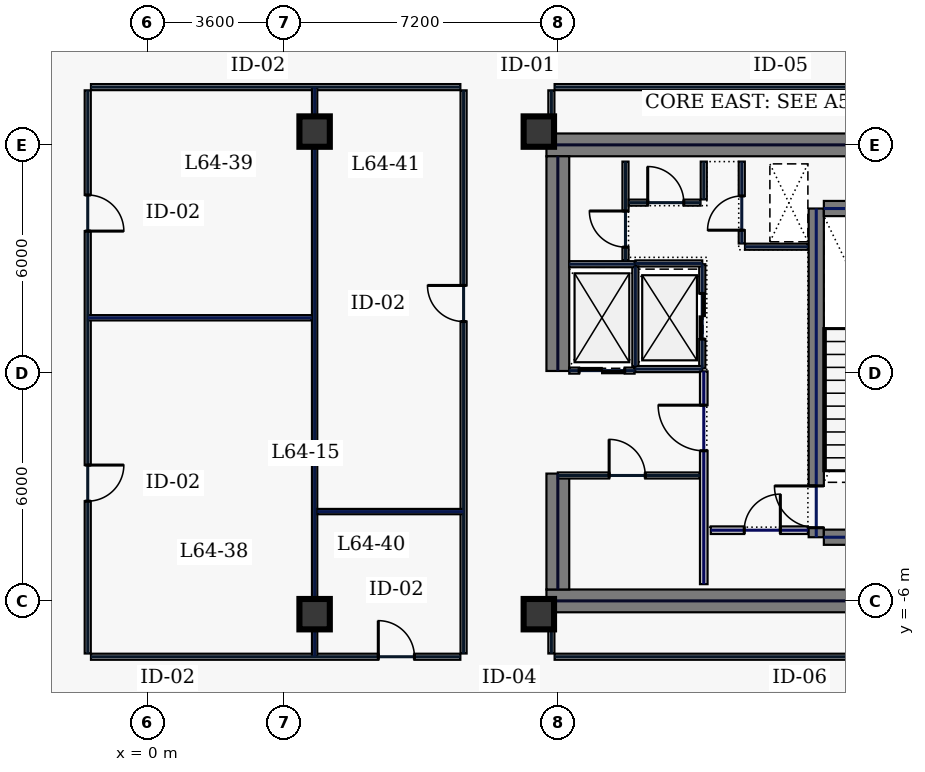
"""IFC4 building model, lengths in metres.
Left out: names, types, materials, properties, quantities, classifications, styles, units other than length and angle.
Written with IfcOpenShell. Run it as: python <this file> out.ifc"""

import sys

from ifc_helpers import new_model, si_unit, direction, frame, frame_2d, origin, origin_2d, place, context, subcontext, project, spatial, rectangle, hollow_rectangle, extrude, element, fill, save


model = new_model("IFC4")
c1 = context("Model", 3, precision=1e-05, world=origin(), true_north=direction((0.0, 1.0)))
c2 = subcontext(c1, "Body", "Model", "MODEL_VIEW")
j1 = project(units=[si_unit("LENGTHUNIT", "METRE"), si_unit("PLANEANGLEUNIT", "RADIAN")], contexts=[c1])
p1 = place(None, origin())
s1 = spatial("IfcSite", under=j1, at=p1, CompositionType="ELEMENT")
p2 = place(p1, origin())
s2 = spatial("IfcBuilding", under=s1, at=p2, CompositionType="ELEMENT")
p3 = place(p2, frame((0.0, 0.0, 277.0)))
s3 = spatial("IfcBuildingStorey", under=s2, at=p3, CompositionType="ELEMENT", Elevation=277.0)
for number, where, z_axis, x_axis in (
    (1, (10.5, 6.0, 0.0), (0.0, 0.0, 1.0), (1.0, 0.0, 0.0)),
    (2, (10.5, -6.0, 0.0), (0.0, 0.0, 1.0), (1.0, 0.0, 0.0)),
):
    element("IfcWall", number, at=place(p3, frame(where, z_axis=z_axis, x_axis=x_axis)), inside=s3, PredefinedType="SHEAR", context=c2, shape_type="SweptSolid", body=[
        extrude(rectangle(XDim=11.5, YDim=0.6, at=frame_2d((5.75, 0.0))), origin(), (0.0, 0.0, 1.0), 3.74),
    ])
p4 = place(p3, frame((10.8, -5.7, 0.0), z_axis=(0.0, 0.0, 1.0), x_axis=(0.0, 1.0, 0.0)))
e3 = element("IfcWall", 3, at=p4, inside=s3, PredefinedType="SHEAR", context=c2, shape_type="SweptSolid", body=[
    extrude(rectangle(XDim=3.05, YDim=0.6, at=frame_2d((1.525, 0.0))), origin(), (0.0, 0.0, 1.0), 3.74),
])
p5 = place(p3, frame((10.8, 0.05, 0.0), z_axis=(0.0, 0.0, 1.0), x_axis=(0.0, 1.0, 0.0)))
e4 = element("IfcWall", 4, at=p5, inside=s3, PredefinedType="SHEAR", context=c2, shape_type="SweptSolid", body=[
    extrude(rectangle(XDim=5.65, YDim=0.6, at=frame_2d((2.825, 0.0))), origin(), (0.0, 0.0, 1.0), 3.74),
])
p6 = place(p3, frame((17.6, -4.325, 0.0), z_axis=(0.0, 0.0, 1.0), x_axis=(0.0, 1.0, 0.0)))
e5 = element("IfcWall", 5, at=p6, inside=s3, PredefinedType="SHEAR", context=c2, shape_type="SweptSolid", body=[
    extrude(rectangle(XDim=8.65, YDim=0.4, at=frame_2d((4.325, 0.0))), origin(), (0.0, 0.0, 1.0), 3.74),
])
p7 = place(p6, frame((0.25, 0.0, 0.0)))
e6 = element("IfcOpeningElement", 6, at=p7, cuts=e5, PredefinedType="OPENING", context=c2, shape_type="SweptSolid", body=[
    extrude(rectangle(XDim=1.1, YDim=2.2, at=frame_2d((0.55, 1.1))), frame((0.0, 0.21, 0.0), z_axis=(0.0, -1.0, 0.0), x_axis=(1.0, 0.0, 0.0)), (0.0, 0.0, 1.0), 0.42),
])
for number, where, z_axis, x_axis in (
    (7, (17.8, -4.325, 0.0), (0.0, 0.0, 1.0), (1.0, 0.0, 0.0)),
    (8, (17.8, 4.325, 0.0), (0.0, 0.0, 1.0), (1.0, 0.0, 0.0)),
):
    element("IfcWall", number, at=place(p3, frame(where, z_axis=z_axis, x_axis=x_axis)), inside=s3, PredefinedType="SHEAR", context=c2, shape_type="SweptSolid", body=[
        extrude(rectangle(XDim=3.4, YDim=0.4, at=frame_2d((1.7, 0.0))), origin(), (0.0, 0.0, 1.0), 3.74),
    ])
for number, where, z_axis, x_axis in (
    (9, (10.3, -6.35, 0.0), (0.0, 0.0, 1.0), (1.0, 0.0, 0.0)),
    (10, (10.3, 6.35, 0.0), (0.0, 0.0, 1.0), (1.0, 0.0, 0.0)),
    (11, (4.4, -6.35, 0.0), (0.0, 0.0, 1.0), (1.0, 0.0, 0.0)),
    (12, (4.4, 6.35, 0.0), (0.0, 0.0, 1.0), (1.0, 0.0, 0.0)),
):
    element("IfcColumn", number, at=place(p3, frame(where, z_axis=z_axis, x_axis=x_axis)), inside=s3, PredefinedType="COLUMN", context=c2, shape_type="SweptSolid", body=[
        extrude(hollow_rectangle(XDim=0.8, YDim=0.8, WallThickness=0.036, at=origin_2d()), origin(), (0.0, 0.0, 1.0), 3.74),
    ])
p8 = place(p3, frame((14.6, 0.12, 0.0), z_axis=(0.0, 0.0, 1.0), x_axis=(0.0, 1.0, 0.0)))
e13 = element("IfcWall", 13, at=p8, inside=s3, PredefinedType="PARTITIONING", context=c2, shape_type="SweptSolid", body=[
    extrude(rectangle(XDim=2.74, YDim=0.16, at=frame_2d((1.37, 0.0))), origin(), (0.0, 0.0, 1.0), 3.74),
])
p9 = place(p8, frame((0.77, 0.0, 0.0)))
e14 = element("IfcOpeningElement", 14, at=p9, cuts=e13, PredefinedType="OPENING", context=c2, shape_type="SweptSolid", body=[
    extrude(rectangle(XDim=1.2, YDim=2.2, at=frame_2d((0.6, 1.1))), frame((0.0, 0.09, 0.0), z_axis=(0.0, -1.0, 0.0), x_axis=(1.0, 0.0, 0.0)), (0.0, 0.0, 1.0), 0.18),
])
for number, where, z_axis, x_axis in (
    (15, (12.84, 0.1, 0.0), (0.0, 0.0, 1.0), (1.0, 0.0, 0.0)),
    (16, (12.84, 2.88, 0.0), (0.0, 0.0, 1.0), (1.0, 0.0, 0.0)),
):
    element("IfcWall", number, at=place(p3, frame(where, z_axis=z_axis, x_axis=x_axis)), inside=s3, PredefinedType="PARTITIONING", context=c2, shape_type="SweptSolid", body=[
        extrude(rectangle(XDim=1.76, YDim=0.16, at=frame_2d((0.88, 0.0))), origin(), (0.0, 0.0, 1.0), 3.74),
    ])
p10 = place(p3, frame((12.84, 0.18, 0.0), z_axis=(0.0, 0.0, 1.0), x_axis=(0.0, 1.0, 0.0)))
e17 = element("IfcWall", 17, at=p10, inside=s3, PredefinedType="PARTITIONING", context=c2, shape_type="SweptSolid", body=[
    extrude(rectangle(XDim=2.62, YDim=0.16, at=frame_2d((1.31, 0.0))), origin(), (0.0, 0.0, 1.0), 3.74),
])
p11 = place(p3, frame((11.1, 0.06, 0.0), z_axis=(0.0, 0.0, 1.0), x_axis=(1.0, 0.0, 0.0)))
e18 = element("IfcWall", 18, at=p11, inside=s3, PredefinedType="PARTITIONING", context=c2, shape_type="SweptSolid", body=[
    extrude(rectangle(XDim=1.72, YDim=0.16, at=frame_2d((0.86, 0.0))), origin(), (0.0, 0.0, 1.0), 3.74),
])
p12 = place(p11, frame((0.26, 0.0, 0.0)))
e19 = element("IfcOpeningElement", 19, at=p12, cuts=e18, PredefinedType="OPENING", context=c2, shape_type="SweptSolid", body=[
    extrude(rectangle(XDim=1.2, YDim=2.2, at=frame_2d((0.6, 1.1))), frame((0.0, 0.09, 0.0), z_axis=(0.0, -1.0, 0.0), x_axis=(1.0, 0.0, 0.0)), (0.0, 0.0, 1.0), 0.18),
])
p13 = place(p3, frame((11.1, 2.86, 0.0), z_axis=(0.0, 0.0, 1.0), x_axis=(1.0, 0.0, 0.0)))
e20 = element("IfcWall", 20, at=p13, inside=s3, PredefinedType="PARTITIONING", context=c2, shape_type="SweptSolid", body=[
    extrude(rectangle(XDim=1.72, YDim=0.16, at=frame_2d((0.86, 0.0))), origin(), (0.0, 0.0, 1.0), 3.74),
])
p14 = place(p3, frame((15.64, 3.405, 0.0), z_axis=(0.0, 0.0, 1.0), x_axis=(0.0, 1.0, 0.0)))
e21 = element("IfcWall", 21, at=p14, inside=s3, PredefinedType="PARTITIONING", context=c2, shape_type="SweptSolid", body=[
    extrude(rectangle(XDim=2.155, YDim=0.16, at=frame_2d((1.078, 0.0))), origin(), (0.0, 0.0, 1.0), 3.74),
])
p15 = place(p14, frame((0.35, 0.0, 0.0)))
e22 = element("IfcOpeningElement", 22, at=p15, cuts=e21, PredefinedType="OPENING", context=c2, shape_type="SweptSolid", body=[
    extrude(rectangle(XDim=0.9, YDim=2.2, at=frame_2d((0.45, 1.1))), frame((0.0, 0.09, 0.0), z_axis=(0.0, -1.0, 0.0), x_axis=(1.0, 0.0, 0.0)), (0.0, 0.0, 1.0), 0.18),
])
p16 = place(p3, frame((15.725, 3.32, 0.0), z_axis=(0.0, 0.0, 1.0), x_axis=(1.0, 0.0, 0.0)))
e23 = element("IfcWall", 23, at=p16, inside=s3, PredefinedType="PARTITIONING", context=c2, shape_type="SweptSolid", body=[
    extrude(rectangle(XDim=1.655, YDim=0.16, at=frame_2d((0.827, 0.0))), origin(), (0.0, 0.0, 1.0), 3.74),
])
p17 = place(p3, frame((14.825, -4.14, 0.0), z_axis=(0.0, 0.0, 1.0), x_axis=(1.0, 0.0, 0.0)))
e24 = element("IfcWall", 24, at=p17, inside=s3, PredefinedType="SOLIDWALL", context=c2, shape_type="SweptSolid", body=[
    extrude(rectangle(XDim=2.555, YDim=0.2, at=frame_2d((1.277, 0.0))), origin(), (0.0, 0.0, 1.0), 3.74),
])
p18 = place(p17, frame((0.88, 0.0, 0.0)))
e25 = element("IfcOpeningElement", 25, at=p18, cuts=e24, PredefinedType="OPENING", context=c2, shape_type="SweptSolid", body=[
    extrude(rectangle(XDim=0.95, YDim=2.2, at=frame_2d((0.475, 1.1))), frame((0.0, 0.11, 0.0), z_axis=(0.0, -1.0, 0.0), x_axis=(1.0, 0.0, 0.0)), (0.0, 0.0, 1.0), 0.22),
])
p19 = place(p3, frame((10.8, -2.7, 0.0), z_axis=(0.0, 0.0, 1.0), x_axis=(1.0, 0.0, 0.0)))
e26 = element("IfcWall", 26, at=p19, inside=s3, PredefinedType="PARTITIONING", context=c2, shape_type="SweptSolid", body=[
    extrude(rectangle(XDim=3.735, YDim=0.16, at=frame_2d((1.867, 0.0))), origin(), (0.0, 0.0, 1.0), 3.74),
])
p20 = place(p19, frame((1.35, 0.0, 0.0)))
e27 = element("IfcOpeningElement", 27, at=p20, cuts=e26, PredefinedType="OPENING", context=c2, shape_type="SweptSolid", body=[
    extrude(rectangle(XDim=0.95, YDim=2.2, at=frame_2d((0.475, 1.1))), frame((0.0, 0.09, 0.0), z_axis=(0.0, -1.0, 0.0), x_axis=(1.0, 0.0, 0.0)), (0.0, 0.0, 1.0), 0.18),
])
p21 = place(p3, frame((12.58, 2.96, 0.0), z_axis=(0.0, 0.0, 1.0), x_axis=(0.0, 1.0, 0.0)))
e28 = element("IfcWall", 28, at=p21, inside=s3, PredefinedType="PARTITIONING", context=c2, shape_type="SweptSolid", body=[
    extrude(rectangle(XDim=2.6, YDim=0.16, at=frame_2d((1.3, 0.0))), origin(), (0.0, 0.0, 1.0), 3.74),
])
p22 = place(p21, frame((0.35, 0.0, 0.0)))
e29 = element("IfcOpeningElement", 29, at=p22, cuts=e28, PredefinedType="OPENING", context=c2, shape_type="SweptSolid", body=[
    extrude(rectangle(XDim=0.95, YDim=2.2, at=frame_2d((0.475, 1.1))), frame((0.0, 0.09, 0.0), z_axis=(0.0, -1.0, 0.0), x_axis=(1.0, 0.0, 0.0)), (0.0, 0.0, 1.0), 0.18),
])
p23 = place(p3, frame((12.665, 4.48, 0.0), z_axis=(0.0, 0.0, 1.0), x_axis=(1.0, 0.0, 0.0)))
e30 = element("IfcWall", 30, at=p23, inside=s3, PredefinedType="PARTITIONING", context=c2, shape_type="SweptSolid", body=[
    extrude(rectangle(XDim=1.89, YDim=0.16, at=frame_2d((0.945, 0.0))), origin(), (0.0, 0.0, 1.0), 3.74),
])
p24 = place(p23, frame((0.5, 0.0, 0.0)))
e31 = element("IfcOpeningElement", 31, at=p24, cuts=e30, PredefinedType="OPENING", context=c2, shape_type="SweptSolid", body=[
    extrude(rectangle(XDim=0.95, YDim=2.2, at=frame_2d((0.475, 1.1))), frame((0.0, 0.09, 0.0), z_axis=(0.0, -1.0, 0.0), x_axis=(1.0, 0.0, 0.0)), (0.0, 0.0, 1.0), 0.18),
])
p25 = place(p3, frame((14.64, 4.565, 0.0), z_axis=(0.0, 0.0, 1.0), x_axis=(0.0, 1.0, 0.0)))
e32 = element("IfcWall", 32, at=p25, inside=s3, PredefinedType="PARTITIONING", context=c2, shape_type="SweptSolid", body=[
    extrude(rectangle(XDim=0.995, YDim=0.16, at=frame_2d((0.498, 0.0))), origin(), (0.0, 0.0, 1.0), 3.74),
])
p26 = place(p3, frame((14.64, -5.56, 0.0), z_axis=(0.0, 0.0, 1.0), x_axis=(0.0, 1.0, 0.0)))
e33 = element("IfcWall", 33, at=p26, inside=s3, PredefinedType="SOLIDWALL", context=c2, shape_type="SweptSolid", body=[
    extrude(rectangle(XDim=5.6, YDim=0.2, at=frame_2d((2.8, 0.0))), origin(), (0.0, 0.0, 1.0), 3.74),
])
p27 = place(p26, frame((3.51, 0.0, 0.0)))
e34 = element("IfcOpeningElement", 34, at=p27, cuts=e33, PredefinedType="OPENING", context=c2, shape_type="SweptSolid", body=[
    extrude(rectangle(XDim=1.2, YDim=2.2, at=frame_2d((0.6, 1.1))), frame((0.0, 0.11, 0.0), z_axis=(0.0, -1.0, 0.0), x_axis=(1.0, 0.0, 0.0)), (0.0, 0.0, 1.0), 0.22),
])
p28 = place(p3, frame((21.915, 7.52, 0.0), z_axis=(0.0, 0.0, 1.0), x_axis=(-1.0, 0.0, 0.0)))
e35 = element("IfcWall", 35, at=p28, inside=s3, PredefinedType="PARTITIONING", context=c2, shape_type="SweptSolid", body=[
    extrude(rectangle(XDim=11.2, YDim=0.16, at=frame_2d((5.6, 0.0))), origin(), (0.0, 0.0, 1.0), 3.74),
])
p29 = place(p3, frame((10.63, 7.435, 0.0), z_axis=(0.0, 0.0, 1.0), x_axis=(0.0, -1.0, 0.0)))
e36 = element("IfcWall", 36, at=p29, inside=s3, PredefinedType="PARTITIONING", context=c2, shape_type="SweptSolid", body=[
    extrude(rectangle(XDim=1.015, YDim=0.16, at=frame_2d((0.508, 0.0))), origin(), (0.0, 0.0, 1.0), 3.74),
])
p30 = place(p3, frame((10.63, -6.42, 0.0), z_axis=(0.0, 0.0, 1.0), x_axis=(0.0, -1.0, 0.0)))
e37 = element("IfcWall", 37, at=p30, inside=s3, PredefinedType="PARTITIONING", context=c2, shape_type="SweptSolid", body=[
    extrude(rectangle(XDim=0.965, YDim=0.16, at=frame_2d((0.482, 0.0))), origin(), (0.0, 0.0, 1.0), 3.74),
])
p31 = place(p3, frame((10.715, -7.47, 0.0), z_axis=(0.0, 0.0, 1.0), x_axis=(1.0, 0.0, 0.0)))
e38 = element("IfcWall", 38, at=p31, inside=s3, PredefinedType="PARTITIONING", context=c2, shape_type="SweptSolid", body=[
    extrude(rectangle(XDim=11.2, YDim=0.16, at=frame_2d((5.6, 0.0))), origin(), (0.0, 0.0, 1.0), 3.74),
])
p32 = place(p3, frame((8.235, 7.52, 0.0), z_axis=(0.0, 0.0, 1.0), x_axis=(-1.0, 0.0, 0.0)))
e39 = element("IfcWall", 39, at=p32, inside=s3, PredefinedType="PARTITIONING", context=c2, shape_type="SweptSolid", body=[
    extrude(rectangle(XDim=9.72, YDim=0.16, at=frame_2d((4.86, 0.0))), origin(), (0.0, 0.0, 1.0), 3.74),
])
p33 = place(p3, frame((-1.57, 7.435, 0.0), z_axis=(0.0, 0.0, 1.0), x_axis=(0.0, -1.0, 0.0)))
e40 = element("IfcWall", 40, at=p33, inside=s3, PredefinedType="PARTITIONING", context=c2, shape_type="SweptSolid", body=[
    extrude(rectangle(XDim=14.82, YDim=0.16, at=frame_2d((7.41, 0.0))), origin(), (0.0, 0.0, 1.0), 3.74),
])
p34 = place(p33, frame((9.861, 0.0, 0.0)))
e41 = element("IfcOpeningElement", 41, at=p34, cuts=e40, PredefinedType="OPENING", context=c2, shape_type="SweptSolid", body=[
    extrude(rectangle(XDim=0.95, YDim=2.2, at=frame_2d((0.475, 1.1))), frame((0.0, 0.09, 0.0), z_axis=(0.0, -1.0, 0.0), x_axis=(1.0, 0.0, 0.0)), (0.0, 0.0, 1.0), 0.18),
])
p35 = place(p33, frame((2.754, 0.0, 0.0)))
e42 = element("IfcOpeningElement", 42, at=p35, cuts=e40, PredefinedType="OPENING", context=c2, shape_type="SweptSolid", body=[
    extrude(rectangle(XDim=0.95, YDim=2.2, at=frame_2d((0.475, 1.1))), frame((0.0, 0.09, 0.0), z_axis=(0.0, -1.0, 0.0), x_axis=(1.0, 0.0, 0.0)), (0.0, 0.0, 1.0), 0.18),
])
p36 = place(p3, frame((-1.485, -7.47, 0.0), z_axis=(0.0, 0.0, 1.0), x_axis=(1.0, 0.0, 0.0)))
e43 = element("IfcWall", 43, at=p36, inside=s3, PredefinedType="PARTITIONING", context=c2, shape_type="SweptSolid", body=[
    extrude(rectangle(XDim=9.72, YDim=0.16, at=frame_2d((4.86, 0.0))), origin(), (0.0, 0.0, 1.0), 3.74),
])
p37 = place(p36, frame((7.561, 0.0, 0.0)))
e44 = element("IfcOpeningElement", 44, at=p37, cuts=e43, PredefinedType="OPENING", context=c2, shape_type="SweptSolid", body=[
    extrude(rectangle(XDim=0.95, YDim=2.2, at=frame_2d((0.475, 1.1))), frame((0.0, 0.09, 0.0), z_axis=(0.0, -1.0, 0.0), x_axis=(1.0, 0.0, 0.0)), (0.0, 0.0, 1.0), 0.18),
])
p38 = place(p3, frame((8.32, -7.385, 0.0), z_axis=(0.0, 0.0, 1.0), x_axis=(0.0, 1.0, 0.0)))
e45 = element("IfcWall", 45, at=p38, inside=s3, PredefinedType="PARTITIONING", context=c2, shape_type="SweptSolid", body=[
    extrude(rectangle(XDim=14.82, YDim=0.16, at=frame_2d((7.41, 0.0))), origin(), (0.0, 0.0, 1.0), 3.74),
])
p39 = place(p38, frame((8.736, 0.0, 0.0)))
e46 = element("IfcOpeningElement", 46, at=p39, cuts=e45, PredefinedType="OPENING", context=c2, shape_type="SweptSolid", body=[
    extrude(rectangle(XDim=0.95, YDim=2.2, at=frame_2d((0.475, 1.1))), frame((0.0, 0.09, 0.0), z_axis=(0.0, -1.0, 0.0), x_axis=(1.0, 0.0, 0.0)), (0.0, 0.0, 1.0), 0.18),
])
p40 = place(p3, frame((4.4, -7.465, 0.0), z_axis=(0.0, 0.0, 1.0), x_axis=(0.0, 1.0, 0.0)))
e47 = element("IfcWall", 47, at=p40, inside=s3, PredefinedType="PARTITIONING", context=c2, shape_type="SweptSolid", body=[
    extrude(rectangle(XDim=14.98, YDim=0.14, at=frame_2d((7.49, 0.0))), origin(), (0.0, 0.0, 1.0), 2.135),
])
p41 = place(p3, frame((-1.565, 1.45, 0.0), z_axis=(0.0, 0.0, 1.0), x_axis=(1.0, 0.0, 0.0)))
e48 = element("IfcWall", 48, at=p41, inside=s3, PredefinedType="PARTITIONING", context=c2, shape_type="SweptSolid", body=[
    extrude(rectangle(XDim=5.89, YDim=0.14, at=frame_2d((2.945, 0.0))), origin(), (0.0, 0.0, 1.0), 3.74),
])
p42 = place(p3, frame((4.475, -3.65, 0.0), z_axis=(0.0, 0.0, 1.0), x_axis=(1.0, 0.0, 0.0)))
e49 = element("IfcWall", 49, at=p42, inside=s3, PredefinedType="PARTITIONING", context=c2, shape_type="SweptSolid", body=[
    extrude(rectangle(XDim=3.84, YDim=0.14, at=frame_2d((1.92, 0.0))), origin(), (0.0, 0.0, 1.0), 3.74),
])
p43 = place(p7, origin())
e50 = element("IfcDoor", 50, at=p43, inside=s3, OperationType="SINGLE_SWING_RIGHT", PredefinedType="DOOR", context=c2, shape_type="SweptSolid", body=[
    extrude(rectangle(XDim=1.1, YDim=2.2, at=frame_2d((0.55, 1.1))), frame((0.0, 0.025, 0.0), z_axis=(0.0, -1.0, 0.0), x_axis=(1.0, 0.0, 0.0)), (0.0, 0.0, 1.0), 0.05),
])
fill(e6, e50)
p44 = place(p9, origin())
e51 = element("IfcDoor", 51, at=p44, inside=s3, OperationType="SLIDING_TO_LEFT", PredefinedType="DOOR", context=c2, shape_type="SweptSolid", body=[
    extrude(rectangle(XDim=1.2, YDim=2.2, at=frame_2d((0.6, 1.1))), frame((0.0, 0.025, 0.0), z_axis=(0.0, -1.0, 0.0), x_axis=(1.0, 0.0, 0.0)), (0.0, 0.0, 1.0), 0.05),
])
fill(e14, e51)
p45 = place(p12, origin())
e52 = element("IfcDoor", 52, at=p45, inside=s3, OperationType="SLIDING_TO_LEFT", PredefinedType="DOOR", context=c2, shape_type="SweptSolid", body=[
    extrude(rectangle(XDim=1.2, YDim=2.2, at=frame_2d((0.6, 1.1))), frame((0.0, 0.025, 0.0), z_axis=(0.0, -1.0, 0.0), x_axis=(1.0, 0.0, 0.0)), (0.0, 0.0, 1.0), 0.05),
])
fill(e19, e52)
p46 = place(p15, origin())
e53 = element("IfcDoor", 53, at=p46, inside=s3, OperationType="SINGLE_SWING_LEFT", PredefinedType="DOOR", context=c2, shape_type="SweptSolid", body=[
    extrude(rectangle(XDim=0.9, YDim=2.2, at=frame_2d((0.45, 1.1))), frame((0.0, 0.025, 0.0), z_axis=(0.0, -1.0, 0.0), x_axis=(1.0, 0.0, 0.0)), (0.0, 0.0, 1.0), 0.05),
])
fill(e22, e53)
p47 = place(p18, origin())
e54 = element("IfcDoor", 54, at=p47, inside=s3, OperationType="SINGLE_SWING_RIGHT", PredefinedType="DOOR", context=c2, shape_type="SweptSolid", body=[
    extrude(rectangle(XDim=0.95, YDim=2.2, at=frame_2d((0.475, 1.1))), frame((0.0, 0.025, 0.0), z_axis=(0.0, -1.0, 0.0), x_axis=(1.0, 0.0, 0.0)), (0.0, 0.0, 1.0), 0.05),
])
fill(e25, e54)
p48 = place(p20, origin())
e55 = element("IfcDoor", 55, at=p48, inside=s3, OperationType="SINGLE_SWING_LEFT", PredefinedType="DOOR", context=c2, shape_type="SweptSolid", body=[
    extrude(rectangle(XDim=0.95, YDim=2.2, at=frame_2d((0.475, 1.1))), frame((0.0, 0.025, 0.0), z_axis=(0.0, -1.0, 0.0), x_axis=(1.0, 0.0, 0.0)), (0.0, 0.0, 1.0), 0.05),
])
fill(e27, e55)
p49 = place(p22, origin())
e56 = element("IfcDoor", 56, at=p49, inside=s3, OperationType="SINGLE_SWING_RIGHT", PredefinedType="DOOR", context=c2, shape_type="SweptSolid", body=[
    extrude(rectangle(XDim=0.95, YDim=2.2, at=frame_2d((0.475, 1.1))), frame((0.0, 0.025, 0.0), z_axis=(0.0, -1.0, 0.0), x_axis=(1.0, 0.0, 0.0)), (0.0, 0.0, 1.0), 0.05),
])
fill(e29, e56)
p50 = place(p24, origin())
e57 = element("IfcDoor", 57, at=p50, inside=s3, OperationType="SINGLE_SWING_LEFT", PredefinedType="DOOR", context=c2, shape_type="SweptSolid", body=[
    extrude(rectangle(XDim=0.95, YDim=2.2, at=frame_2d((0.475, 1.1))), frame((0.0, 0.025, 0.0), z_axis=(0.0, -1.0, 0.0), x_axis=(1.0, 0.0, 0.0)), (0.0, 0.0, 1.0), 0.05),
])
fill(e31, e57)
p51 = place(p27, origin())
e58 = element("IfcDoor", 58, at=p51, inside=s3, OperationType="SINGLE_SWING_RIGHT", PredefinedType="DOOR", context=c2, shape_type="SweptSolid", body=[
    extrude(rectangle(XDim=1.2, YDim=2.2, at=frame_2d((0.6, 1.1))), frame((0.0, 0.025, 0.0), z_axis=(0.0, -1.0, 0.0), x_axis=(1.0, 0.0, 0.0)), (0.0, 0.0, 1.0), 0.05),
])
fill(e34, e58)
p52 = place(p34, origin())
e59 = element("IfcDoor", 59, at=p52, inside=s3, OperationType="SINGLE_SWING_LEFT", PredefinedType="DOOR", context=c2, shape_type="SweptSolid", body=[
    extrude(rectangle(XDim=0.95, YDim=2.2, at=frame_2d((0.475, 1.1))), frame((0.0, 0.025, 0.0), z_axis=(0.0, -1.0, 0.0), x_axis=(1.0, 0.0, 0.0)), (0.0, 0.0, 1.0), 0.05),
])
fill(e41, e59)
p53 = place(p35, origin())
e60 = element("IfcDoor", 60, at=p53, inside=s3, OperationType="SINGLE_SWING_RIGHT", PredefinedType="DOOR", context=c2, shape_type="SweptSolid", body=[
    extrude(rectangle(XDim=0.95, YDim=2.2, at=frame_2d((0.475, 1.1))), frame((0.0, 0.025, 0.0), z_axis=(0.0, -1.0, 0.0), x_axis=(1.0, 0.0, 0.0)), (0.0, 0.0, 1.0), 0.05),
])
fill(e42, e60)
p54 = place(p37, origin())
e61 = element("IfcDoor", 61, at=p54, inside=s3, OperationType="SINGLE_SWING_LEFT", PredefinedType="DOOR", context=c2, shape_type="SweptSolid", body=[
    extrude(rectangle(XDim=0.95, YDim=2.2, at=frame_2d((0.475, 1.1))), frame((0.0, 0.025, 0.0), z_axis=(0.0, -1.0, 0.0), x_axis=(1.0, 0.0, 0.0)), (0.0, 0.0, 1.0), 0.05),
])
fill(e44, e61)
p55 = place(p39, origin())
e62 = element("IfcDoor", 62, at=p55, inside=s3, OperationType="SINGLE_SWING_RIGHT", PredefinedType="DOOR", context=c2, shape_type="SweptSolid", body=[
    extrude(rectangle(XDim=0.95, YDim=2.2, at=frame_2d((0.475, 1.1))), frame((0.0, 0.025, 0.0), z_axis=(0.0, -1.0, 0.0), x_axis=(1.0, 0.0, 0.0)), (0.0, 0.0, 1.0), 0.05),
])
fill(e46, e62)
save(model, sys.argv[1])
